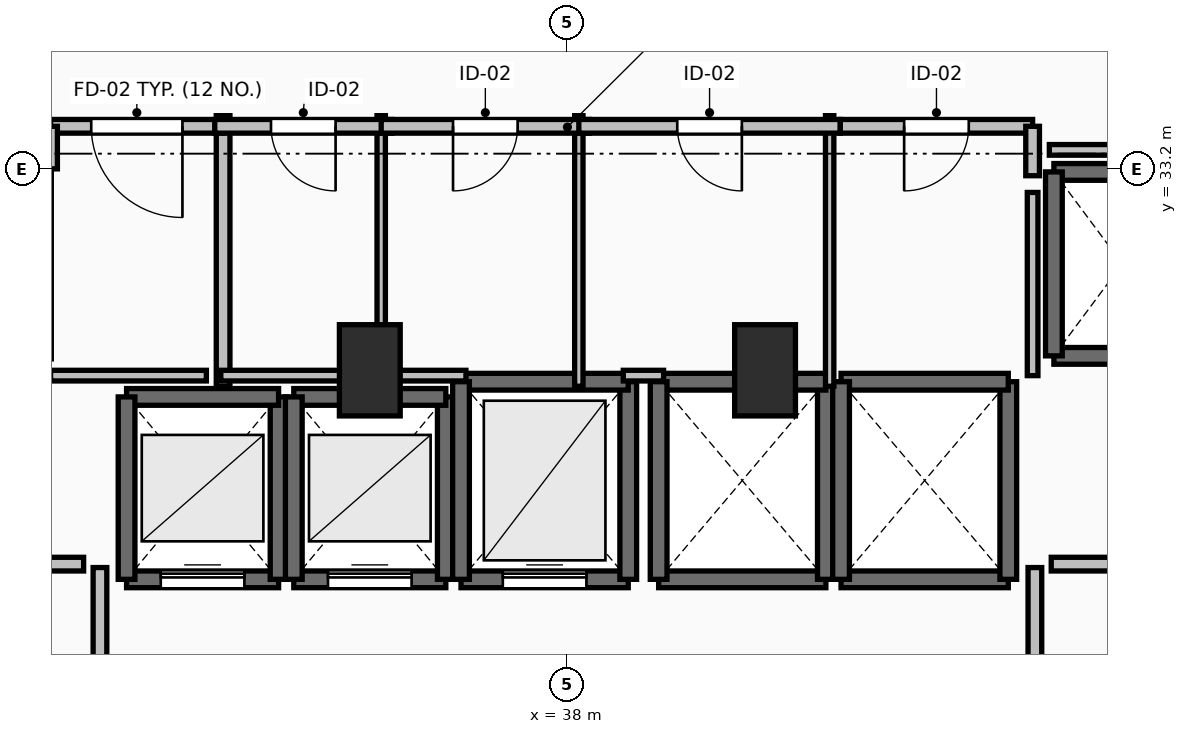
"""IFC4 building model, lengths in metres.
Left out: names, types, materials, properties, quantities, classifications, styles, units other than length and angle.
Written with IfcOpenShell. Run it as: python <this file> out.ifc"""

import sys

from ifc_helpers import new_model, si_unit, direction, frame, frame_2d, origin, origin_2d, place, context, subcontext, project, spatial, rectangle, extrude, element, fill, save


model = new_model("IFC4")
c1 = context("Model", 3, precision=1e-05, world=origin(), true_north=direction((0.0, 1.0)))
c2 = subcontext(c1, "Body", "Model", "MODEL_VIEW")
j1 = project(units=[si_unit("LENGTHUNIT", "METRE"), si_unit("PLANEANGLEUNIT", "RADIAN")], contexts=[c1])
p1 = place(None, origin())
s1 = spatial("IfcSite", under=j1, at=p1, CompositionType="ELEMENT")
p2 = place(p1, origin())
s2 = spatial("IfcBuilding", under=s1, at=p2, CompositionType="ELEMENT")
p3 = place(p2, frame((0.0, 0.0, 14.4)))
s3 = spatial("IfcBuildingStorey", under=s2, at=p3, CompositionType="ELEMENT", Elevation=14.4)
for number, where, z_axis, x_axis in (
    (1, (35.4, 30.55, 0.0), (0.0, 0.0, 1.0), (1.0, 0.0, 0.0)),
    (2, (40.6, 30.55, 0.0), (0.0, 0.0, 1.0), (1.0, 0.0, 0.0)),
):
    element("IfcColumn", number, at=place(p3, frame(where, z_axis=z_axis, x_axis=x_axis)), inside=s3, PredefinedType="PILASTER", context=c2, shape_type="SweptSolid", body=[
        extrude(rectangle(XDim=0.8, YDim=1.2, at=origin_2d()), origin(), (0.0, 0.0, 1.0), 4.8),
    ])
p4 = place(p3, frame((32.2, 27.8, 0.0), z_axis=(0.0, 0.0, 1.0), x_axis=(1.0, 0.0, 0.0)))
e3 = element("IfcWall", 3, at=p4, inside=s3, PredefinedType="SOLIDWALL", context=c2, shape_type="SweptSolid", body=[
    extrude(rectangle(XDim=2.0, YDim=0.22, at=frame_2d((1.0, 0.0))), origin(), (0.0, 0.0, 1.0), 4.48),
])
p5 = place(p4, frame((0.45, 0.0, 0.0)))
e4 = element("IfcOpeningElement", 4, at=p5, cuts=e3, PredefinedType="OPENING", context=c2, shape_type="SweptSolid", body=[
    extrude(rectangle(XDim=1.1, YDim=2.2, at=frame_2d((0.55, 1.1))), frame((0.0, 0.125, 0.0), z_axis=(0.0, -1.0, 0.0), x_axis=(1.0, 0.0, 0.0)), (0.0, 0.0, 1.0), 0.25),
])
p6 = place(p3, frame((34.2, 27.8, 0.0), z_axis=(0.0, 0.0, 1.0), x_axis=(0.0, 1.0, 0.0)))
e5 = element("IfcWall", 5, at=p6, inside=s3, PredefinedType="SOLIDWALL", context=c2, shape_type="SweptSolid", body=[
    extrude(rectangle(XDim=2.4, YDim=0.22, at=frame_2d((1.2, 0.0))), origin(), (0.0, 0.0, 1.0), 4.48),
])
p7 = place(p3, frame((34.2, 30.2, 0.0), z_axis=(0.0, 0.0, 1.0), x_axis=(-1.0, 0.0, 0.0)))
e6 = element("IfcWall", 6, at=p7, inside=s3, PredefinedType="SOLIDWALL", context=c2, shape_type="SweptSolid", body=[
    extrude(rectangle(XDim=2.0, YDim=0.22, at=frame_2d((1.0, 0.0))), origin(), (0.0, 0.0, 1.0), 4.48),
])
p8 = place(p3, frame((32.2, 30.2, 0.0), z_axis=(0.0, 0.0, 1.0), x_axis=(0.0, -1.0, 0.0)))
e7 = element("IfcWall", 7, at=p8, inside=s3, PredefinedType="SOLIDWALL", context=c2, shape_type="SweptSolid", body=[
    extrude(rectangle(XDim=2.4, YDim=0.22, at=frame_2d((1.2, 0.0))), origin(), (0.0, 0.0, 1.0), 4.48),
])
p9 = place(p3, frame((34.4, 27.8, 0.0), z_axis=(0.0, 0.0, 1.0), x_axis=(1.0, 0.0, 0.0)))
e8 = element("IfcWall", 8, at=p9, inside=s3, PredefinedType="SOLIDWALL", context=c2, shape_type="SweptSolid", body=[
    extrude(rectangle(XDim=2.0, YDim=0.22, at=frame_2d((1.0, 0.0))), origin(), (0.0, 0.0, 1.0), 4.48),
])
p10 = place(p9, frame((0.45, 0.0, 0.0)))
e9 = element("IfcOpeningElement", 9, at=p10, cuts=e8, PredefinedType="OPENING", context=c2, shape_type="SweptSolid", body=[
    extrude(rectangle(XDim=1.1, YDim=2.2, at=frame_2d((0.55, 1.1))), frame((0.0, 0.125, 0.0), z_axis=(0.0, -1.0, 0.0), x_axis=(1.0, 0.0, 0.0)), (0.0, 0.0, 1.0), 0.25),
])
p11 = place(p3, frame((36.4, 27.8, 0.0), z_axis=(0.0, 0.0, 1.0), x_axis=(0.0, 1.0, 0.0)))
e10 = element("IfcWall", 10, at=p11, inside=s3, PredefinedType="SOLIDWALL", context=c2, shape_type="SweptSolid", body=[
    extrude(rectangle(XDim=2.4, YDim=0.22, at=frame_2d((1.2, 0.0))), origin(), (0.0, 0.0, 1.0), 4.48),
])
p12 = place(p3, frame((36.4, 30.2, 0.0), z_axis=(0.0, 0.0, 1.0), x_axis=(-1.0, 0.0, 0.0)))
e11 = element("IfcWall", 11, at=p12, inside=s3, PredefinedType="SOLIDWALL", context=c2, shape_type="SweptSolid", body=[
    extrude(rectangle(XDim=2.0, YDim=0.22, at=frame_2d((1.0, 0.0))), origin(), (0.0, 0.0, 1.0), 4.48),
])
p13 = place(p3, frame((34.4, 30.2, 0.0), z_axis=(0.0, 0.0, 1.0), x_axis=(0.0, -1.0, 0.0)))
e12 = element("IfcWall", 12, at=p13, inside=s3, PredefinedType="SOLIDWALL", context=c2, shape_type="SweptSolid", body=[
    extrude(rectangle(XDim=2.4, YDim=0.22, at=frame_2d((1.2, 0.0))), origin(), (0.0, 0.0, 1.0), 4.48),
])
p14 = place(p3, frame((36.6, 27.8, 0.0), z_axis=(0.0, 0.0, 1.0), x_axis=(1.0, 0.0, 0.0)))
e13 = element("IfcWall", 13, at=p14, inside=s3, PredefinedType="SOLIDWALL", context=c2, shape_type="SweptSolid", body=[
    extrude(rectangle(XDim=2.2, YDim=0.22, at=frame_2d((1.1, 0.0))), origin(), (0.0, 0.0, 1.0), 4.48),
])
p15 = place(p14, frame((0.55, 0.0, 0.0)))
e14 = element("IfcOpeningElement", 14, at=p15, cuts=e13, PredefinedType="OPENING", context=c2, shape_type="SweptSolid", body=[
    extrude(rectangle(XDim=1.1, YDim=2.2, at=frame_2d((0.55, 1.1))), frame((0.0, 0.125, 0.0), z_axis=(0.0, -1.0, 0.0), x_axis=(1.0, 0.0, 0.0)), (0.0, 0.0, 1.0), 0.25),
])
p16 = place(p3, frame((38.8, 27.8, 0.0), z_axis=(0.0, 0.0, 1.0), x_axis=(0.0, 1.0, 0.0)))
e15 = element("IfcWall", 15, at=p16, inside=s3, PredefinedType="SOLIDWALL", context=c2, shape_type="SweptSolid", body=[
    extrude(rectangle(XDim=2.6, YDim=0.22, at=frame_2d((1.3, 0.0))), origin(), (0.0, 0.0, 1.0), 4.48),
])
p17 = place(p3, frame((38.8, 30.4, 0.0), z_axis=(0.0, 0.0, 1.0), x_axis=(-1.0, 0.0, 0.0)))
e16 = element("IfcWall", 16, at=p17, inside=s3, PredefinedType="SOLIDWALL", context=c2, shape_type="SweptSolid", body=[
    extrude(rectangle(XDim=2.2, YDim=0.22, at=frame_2d((1.1, 0.0))), origin(), (0.0, 0.0, 1.0), 4.48),
])
p18 = place(p3, frame((36.6, 30.4, 0.0), z_axis=(0.0, 0.0, 1.0), x_axis=(0.0, -1.0, 0.0)))
e17 = element("IfcWall", 17, at=p18, inside=s3, PredefinedType="SOLIDWALL", context=c2, shape_type="SweptSolid", body=[
    extrude(rectangle(XDim=2.6, YDim=0.22, at=frame_2d((1.3, 0.0))), origin(), (0.0, 0.0, 1.0), 4.48),
])
p19 = place(p3, frame((39.2, 27.8, 0.0), z_axis=(0.0, 0.0, 1.0), x_axis=(1.0, 0.0, 0.0)))
e18 = element("IfcWall", 18, at=p19, inside=s3, PredefinedType="SOLIDWALL", context=c2, shape_type="SweptSolid", body=[
    extrude(rectangle(XDim=2.2, YDim=0.22, at=frame_2d((1.1, 0.0))), origin(), (0.0, 0.0, 1.0), 4.48),
])
p20 = place(p3, frame((41.4, 27.8, 0.0), z_axis=(0.0, 0.0, 1.0), x_axis=(0.0, 1.0, 0.0)))
e19 = element("IfcWall", 19, at=p20, inside=s3, PredefinedType="SOLIDWALL", context=c2, shape_type="SweptSolid", body=[
    extrude(rectangle(XDim=2.6, YDim=0.22, at=frame_2d((1.3, 0.0))), origin(), (0.0, 0.0, 1.0), 4.48),
])
p21 = place(p3, frame((41.4, 30.4, 0.0), z_axis=(0.0, 0.0, 1.0), x_axis=(-1.0, 0.0, 0.0)))
e20 = element("IfcWall", 20, at=p21, inside=s3, PredefinedType="SOLIDWALL", context=c2, shape_type="SweptSolid", body=[
    extrude(rectangle(XDim=2.2, YDim=0.22, at=frame_2d((1.1, 0.0))), origin(), (0.0, 0.0, 1.0), 4.48),
])
p22 = place(p3, frame((39.2, 30.4, 0.0), z_axis=(0.0, 0.0, 1.0), x_axis=(0.0, -1.0, 0.0)))
e21 = element("IfcWall", 21, at=p22, inside=s3, PredefinedType="SOLIDWALL", context=c2, shape_type="SweptSolid", body=[
    extrude(rectangle(XDim=2.6, YDim=0.22, at=frame_2d((1.3, 0.0))), origin(), (0.0, 0.0, 1.0), 4.48),
])
p23 = place(p3, frame((41.6, 27.8, 0.0), z_axis=(0.0, 0.0, 1.0), x_axis=(1.0, 0.0, 0.0)))
e22 = element("IfcWall", 22, at=p23, inside=s3, PredefinedType="SOLIDWALL", context=c2, shape_type="SweptSolid", body=[
    extrude(rectangle(XDim=2.2, YDim=0.22, at=frame_2d((1.1, 0.0))), origin(), (0.0, 0.0, 1.0), 4.48),
])
p24 = place(p3, frame((43.8, 27.8, 0.0), z_axis=(0.0, 0.0, 1.0), x_axis=(0.0, 1.0, 0.0)))
e23 = element("IfcWall", 23, at=p24, inside=s3, PredefinedType="SOLIDWALL", context=c2, shape_type="SweptSolid", body=[
    extrude(rectangle(XDim=2.6, YDim=0.22, at=frame_2d((1.3, 0.0))), origin(), (0.0, 0.0, 1.0), 4.48),
])
p25 = place(p3, frame((43.8, 30.4, 0.0), z_axis=(0.0, 0.0, 1.0), x_axis=(-1.0, 0.0, 0.0)))
e24 = element("IfcWall", 24, at=p25, inside=s3, PredefinedType="SOLIDWALL", context=c2, shape_type="SweptSolid", body=[
    extrude(rectangle(XDim=2.2, YDim=0.22, at=frame_2d((1.1, 0.0))), origin(), (0.0, 0.0, 1.0), 4.48),
])
p26 = place(p3, frame((41.6, 30.4, 0.0), z_axis=(0.0, 0.0, 1.0), x_axis=(0.0, -1.0, 0.0)))
e25 = element("IfcWall", 25, at=p26, inside=s3, PredefinedType="SOLIDWALL", context=c2, shape_type="SweptSolid", body=[
    extrude(rectangle(XDim=2.6, YDim=0.22, at=frame_2d((1.3, 0.0))), origin(), (0.0, 0.0, 1.0), 4.48),
])
for number, where, z_axis, x_axis in (
    (26, (44.4, 30.74, 0.0), (0.0, 0.0, 1.0), (1.0, 0.0, 0.0)),
    (27, (46.2, 33.16, 0.0), (0.0, 0.0, 1.0), (-1.0, 0.0, 0.0)),
):
    element("IfcWall", number, at=place(p3, frame(where, z_axis=z_axis, x_axis=x_axis)), inside=s3, PredefinedType="SOLIDWALL", context=c2, shape_type="SweptSolid", body=[
        extrude(rectangle(XDim=1.8, YDim=0.22, at=frame_2d((0.9, 0.0))), origin(), (0.0, 0.0, 1.0), 4.48),
    ])
p27 = place(p3, frame((44.4, 33.16, 0.0), z_axis=(0.0, 0.0, 1.0), x_axis=(0.0, -1.0, 0.0)))
e28 = element("IfcWall", 28, at=p27, inside=s3, PredefinedType="SOLIDWALL", context=c2, shape_type="SweptSolid", body=[
    extrude(rectangle(XDim=2.42, YDim=0.22, at=frame_2d((1.21, 0.0))), origin(), (0.0, 0.0, 1.0), 4.48),
])
p28 = place(p3, frame((31.85, 24.045, 0.0), z_axis=(0.0, 0.0, 1.0), x_axis=(0.0, 1.0, 0.0)))
e29 = element("IfcWall", 29, at=p28, inside=s3, PredefinedType="PARTITIONING", context=c2, shape_type="SweptSolid", body=[
    extrude(rectangle(XDim=3.91, YDim=0.18, at=frame_2d((1.955, 0.0))), origin(), (0.0, 0.0, 1.0), 4.48),
])
p29 = place(p28, frame((1.355, 0.0, 0.0)))
e30 = element("IfcOpeningElement", 30, at=p29, cuts=e29, PredefinedType="OPENING", context=c2, shape_type="SweptSolid", body=[
    extrude(rectangle(XDim=1.2, YDim=2.15, at=frame_2d((0.6, 1.075))), frame((0.0, 0.105, 0.0), z_axis=(0.0, -1.0, 0.0), x_axis=(1.0, 0.0, 0.0)), (0.0, 0.0, 1.0), 0.21),
])
p30 = place(p3, frame((44.15, 27.955, 0.0), z_axis=(0.0, 0.0, 1.0), x_axis=(0.0, -1.0, 0.0)))
e31 = element("IfcWall", 31, at=p30, inside=s3, PredefinedType="PARTITIONING", context=c2, shape_type="SweptSolid", body=[
    extrude(rectangle(XDim=3.91, YDim=0.18, at=frame_2d((1.955, 0.0))), origin(), (0.0, 0.0, 1.0), 4.48),
])
p31 = place(p30, frame((1.355, 0.0, 0.0)))
e32 = element("IfcOpeningElement", 32, at=p31, cuts=e31, PredefinedType="OPENING", context=c2, shape_type="SweptSolid", body=[
    extrude(rectangle(XDim=1.2, YDim=2.15, at=frame_2d((0.6, 1.075))), frame((0.0, 0.105, 0.0), z_axis=(0.0, -1.0, 0.0), x_axis=(1.0, 0.0, 0.0)), (0.0, 0.0, 1.0), 0.21),
])
p32 = place(p3, frame((33.47, 30.34, 0.0), z_axis=(0.0, 0.0, 1.0), x_axis=(0.0, 1.0, 0.0)))
e33 = element("IfcWall", 33, at=p32, inside=s3, PredefinedType="PARTITIONING", context=c2, shape_type="SweptSolid", body=[
    extrude(rectangle(XDim=3.56, YDim=0.18, at=frame_2d((1.78, 0.0))), origin(), (0.0, 0.0, 1.0), 4.48),
])
p33 = place(p3, frame((33.47, 33.76, 0.0), z_axis=(0.0, 0.0, 1.0), x_axis=(-1.0, 0.0, 0.0)))
e34 = element("IfcWall", 34, at=p33, inside=s3, PredefinedType="PARTITIONING", context=c2, shape_type="SweptSolid", body=[
    extrude(rectangle(XDim=2.27, YDim=0.18, at=frame_2d((1.135, 0.0))), origin(), (0.0, 0.0, 1.0), 4.48),
])
p34 = place(p33, frame((0.535, 0.0, 0.0)))
e35 = element("IfcOpeningElement", 35, at=p34, cuts=e34, PredefinedType="OPENING", context=c2, shape_type="SweptSolid", body=[
    extrude(rectangle(XDim=1.2, YDim=2.15, at=frame_2d((0.6, 1.075))), frame((0.0, 0.105, 0.0), z_axis=(0.0, -1.0, 0.0), x_axis=(1.0, 0.0, 0.0)), (0.0, 0.0, 1.0), 0.21),
])
p35 = place(p3, frame((31.2, 33.76, 0.0), z_axis=(0.0, 0.0, 1.0), x_axis=(0.0, -1.0, 0.0)))
e36 = element("IfcWall", 36, at=p35, inside=s3, PredefinedType="PARTITIONING", context=c2, shape_type="SweptSolid", body=[
    extrude(rectangle(XDim=0.56, YDim=0.18, at=frame_2d((0.28, 0.0))), origin(), (0.0, 0.0, 1.0), 4.48),
])
p36 = place(p3, frame((35.55, 30.34, 0.0), z_axis=(0.0, 0.0, 1.0), x_axis=(0.0, 1.0, 0.0)))
e37 = element("IfcWall", 37, at=p36, inside=s3, PredefinedType="PARTITIONING", context=c2, shape_type="SweptSolid", body=[
    extrude(rectangle(XDim=3.56, YDim=0.11, at=frame_2d((1.78, 0.0))), origin(), (0.0, 0.0, 1.0), 3.672),
])
p37 = place(p3, frame((35.69, 33.76, 0.0), z_axis=(0.0, 0.0, 1.0), x_axis=(-1.0, 0.0, 0.0)))
e38 = element("IfcWall", 38, at=p37, inside=s3, PredefinedType="PARTITIONING", context=c2, shape_type="SweptSolid", body=[
    extrude(rectangle(XDim=2.33, YDim=0.18, at=frame_2d((1.165, 0.0))), origin(), (0.0, 0.0, 1.0), 4.48),
])
p38 = place(p37, frame((0.74, 0.0, 0.0)))
e39 = element("IfcOpeningElement", 39, at=p38, cuts=e38, PredefinedType="OPENING", context=c2, shape_type="SweptSolid", body=[
    extrude(rectangle(XDim=0.85, YDim=2.1, at=frame_2d((0.425, 1.05))), frame((0.0, 0.105, 0.0), z_axis=(0.0, -1.0, 0.0), x_axis=(1.0, 0.0, 0.0)), (0.0, 0.0, 1.0), 0.21),
])
p39 = place(p3, frame((38.15, 30.34, 0.0), z_axis=(0.0, 0.0, 1.0), x_axis=(0.0, 1.0, 0.0)))
e40 = element("IfcWall", 40, at=p39, inside=s3, PredefinedType="PARTITIONING", context=c2, shape_type="SweptSolid", body=[
    extrude(rectangle(XDim=3.56, YDim=0.11, at=frame_2d((1.78, 0.0))), origin(), (0.0, 0.0, 1.0), 3.672),
])
p40 = place(p3, frame((38.29, 33.76, 0.0), z_axis=(0.0, 0.0, 1.0), x_axis=(-1.0, 0.0, 0.0)))
e41 = element("IfcWall", 41, at=p40, inside=s3, PredefinedType="PARTITIONING", context=c2, shape_type="SweptSolid", body=[
    extrude(rectangle(XDim=2.74, YDim=0.18, at=frame_2d((1.37, 0.0))), origin(), (0.0, 0.0, 1.0), 4.48),
])
p41 = place(p40, frame((0.945, 0.0, 0.0)))
e42 = element("IfcOpeningElement", 42, at=p41, cuts=e41, PredefinedType="OPENING", context=c2, shape_type="SweptSolid", body=[
    extrude(rectangle(XDim=0.85, YDim=2.1, at=frame_2d((0.425, 1.05))), frame((0.0, 0.105, 0.0), z_axis=(0.0, -1.0, 0.0), x_axis=(1.0, 0.0, 0.0)), (0.0, 0.0, 1.0), 0.21),
])
p42 = place(p3, frame((41.45, 30.34, 0.0), z_axis=(0.0, 0.0, 1.0), x_axis=(0.0, 1.0, 0.0)))
e43 = element("IfcWall", 43, at=p42, inside=s3, PredefinedType="PARTITIONING", context=c2, shape_type="SweptSolid", body=[
    extrude(rectangle(XDim=3.56, YDim=0.11, at=frame_2d((1.78, 0.0))), origin(), (0.0, 0.0, 1.0), 4.48),
])
p43 = place(p3, frame((41.59, 33.76, 0.0), z_axis=(0.0, 0.0, 1.0), x_axis=(-1.0, 0.0, 0.0)))
e44 = element("IfcWall", 44, at=p43, inside=s3, PredefinedType="PARTITIONING", context=c2, shape_type="SweptSolid", body=[
    extrude(rectangle(XDim=3.44, YDim=0.18, at=frame_2d((1.72, 0.0))), origin(), (0.0, 0.0, 1.0), 4.48),
])
p44 = place(p43, frame((1.295, 0.0, 0.0)))
e45 = element("IfcOpeningElement", 45, at=p44, cuts=e44, PredefinedType="OPENING", context=c2, shape_type="SweptSolid", body=[
    extrude(rectangle(XDim=0.85, YDim=2.1, at=frame_2d((0.425, 1.05))), frame((0.0, 0.105, 0.0), z_axis=(0.0, -1.0, 0.0), x_axis=(1.0, 0.0, 0.0)), (0.0, 0.0, 1.0), 0.21),
])
p45 = place(p3, frame((44.12, 33.76, 0.0), z_axis=(0.0, 0.0, 1.0), x_axis=(-1.0, 0.0, 0.0)))
e46 = element("IfcWall", 46, at=p45, inside=s3, PredefinedType="PARTITIONING", context=c2, shape_type="SweptSolid", body=[
    extrude(rectangle(XDim=2.53, YDim=0.18, at=frame_2d((1.265, 0.0))), origin(), (0.0, 0.0, 1.0), 4.48),
])
p46 = place(p45, frame((0.84, 0.0, 0.0)))
e47 = element("IfcOpeningElement", 47, at=p46, cuts=e46, PredefinedType="OPENING", context=c2, shape_type="SweptSolid", body=[
    extrude(rectangle(XDim=0.85, YDim=2.1, at=frame_2d((0.425, 1.05))), frame((0.0, 0.105, 0.0), z_axis=(0.0, -1.0, 0.0), x_axis=(1.0, 0.0, 0.0)), (0.0, 0.0, 1.0), 0.21),
])
p47 = place(p3, frame((44.12, 33.11, 0.0), z_axis=(0.0, 0.0, 1.0), x_axis=(0.0, 1.0, 0.0)))
e48 = element("IfcWall", 48, at=p47, inside=s3, PredefinedType="PARTITIONING", context=c2, shape_type="SweptSolid", body=[
    extrude(rectangle(XDim=0.65, YDim=0.18, at=frame_2d((0.325, 0.0))), origin(), (0.0, 0.0, 1.0), 4.48),
])
for number, where, z_axis, x_axis in (
    (49, (31.635, 28.0, 0.0), (0.0, 0.0, 1.0), (-1.0, 0.0, 0.0)),
    (50, (45.28, 28.0, 0.0), (0.0, 0.0, 1.0), (-1.0, 0.0, 0.0)),
):
    element("IfcWall", number, at=place(p3, frame(where, z_axis=z_axis, x_axis=x_axis)), inside=s3, PredefinedType="PARTITIONING", context=c2, shape_type="SweptSolid", body=[
        extrude(rectangle(XDim=0.915, YDim=0.18, at=frame_2d((0.458, 0.0))), origin(), (0.0, 0.0, 1.0), 4.48),
    ])
p48 = place(p3, frame((31.2, 30.48, 0.0), z_axis=(0.0, 0.0, 1.0), x_axis=(1.0, 0.0, 0.0)))
e51 = element("IfcWall", 51, at=p48, inside=s3, PredefinedType="PARTITIONING", context=c2, shape_type="SweptSolid", body=[
    extrude(rectangle(XDim=2.05, YDim=0.14, at=frame_2d((1.025, 0.0))), origin(), (0.0, 0.0, 1.0), 4.48),
])
p49 = place(p3, frame((33.44, 30.48, 0.0), z_axis=(0.0, 0.0, 1.0), x_axis=(1.0, 0.0, 0.0)))
e52 = element("IfcWall", 52, at=p49, inside=s3, PredefinedType="PARTITIONING", context=c2, shape_type="SweptSolid", body=[
    extrude(rectangle(XDim=2.14, YDim=0.14, at=frame_2d((1.07, 0.0))), origin(), (0.0, 0.0, 1.0), 3.672),
])
p50 = place(p3, frame((35.6, 30.48, 0.0), z_axis=(0.0, 0.0, 1.0), x_axis=(1.0, 0.0, 0.0)))
e53 = element("IfcWall", 53, at=p50, inside=s3, PredefinedType="PARTITIONING", context=c2, shape_type="SweptSolid", body=[
    extrude(rectangle(XDim=1.065, YDim=0.14, at=frame_2d((0.532, 0.0))), origin(), (0.0, 0.0, 1.0), 3.672),
])
p51 = place(p3, frame((38.735, 30.48, 0.0), z_axis=(0.0, 0.0, 1.0), x_axis=(1.0, 0.0, 0.0)))
e54 = element("IfcWall", 54, at=p51, inside=s3, PredefinedType="PARTITIONING", context=c2, shape_type="SweptSolid", body=[
    extrude(rectangle(XDim=0.53, YDim=0.14, at=frame_2d((0.265, 0.0))), origin(), (0.0, 0.0, 1.0), 3.672),
])
p52 = place(p3, frame((44.12, 30.48, 0.0), z_axis=(0.0, 0.0, 1.0), x_axis=(0.0, 1.0, 0.0)))
e55 = element("IfcWall", 55, at=p52, inside=s3, PredefinedType="PARTITIONING", context=c2, shape_type="SweptSolid", body=[
    extrude(rectangle(XDim=2.41, YDim=0.14, at=frame_2d((1.205, 0.0))), origin(), (0.0, 0.0, 1.0), 4.48),
])
p53 = place(p3, frame((44.34, 33.45, 0.0), z_axis=(0.0, 0.0, 1.0), x_axis=(1.0, 0.0, 0.0)))
e56 = element("IfcWall", 56, at=p53, inside=s3, PredefinedType="PARTITIONING", context=c2, shape_type="SweptSolid", body=[
    extrude(rectangle(XDim=4.21, YDim=0.14, at=frame_2d((2.105, 0.0))), origin(), (0.0, 0.0, 1.0), 3.672),
])
p54 = place(p5, origin())
e57 = element("IfcDoor", 57, at=p54, inside=s3, OperationType="SLIDING_TO_LEFT", PredefinedType="DOOR", context=c2, shape_type="SweptSolid", body=[
    extrude(rectangle(XDim=1.1, YDim=2.2, at=frame_2d((0.55, 1.1))), frame((0.0, 0.025, 0.0), z_axis=(0.0, -1.0, 0.0), x_axis=(1.0, 0.0, 0.0)), (0.0, 0.0, 1.0), 0.05),
])
fill(e4, e57)
p55 = place(p10, origin())
e58 = element("IfcDoor", 58, at=p55, inside=s3, OperationType="SLIDING_TO_LEFT", PredefinedType="DOOR", context=c2, shape_type="SweptSolid", body=[
    extrude(rectangle(XDim=1.1, YDim=2.2, at=frame_2d((0.55, 1.1))), frame((0.0, 0.025, 0.0), z_axis=(0.0, -1.0, 0.0), x_axis=(1.0, 0.0, 0.0)), (0.0, 0.0, 1.0), 0.05),
])
fill(e9, e58)
p56 = place(p15, origin())
e59 = element("IfcDoor", 59, at=p56, inside=s3, OperationType="SLIDING_TO_LEFT", PredefinedType="DOOR", context=c2, shape_type="SweptSolid", body=[
    extrude(rectangle(XDim=1.1, YDim=2.2, at=frame_2d((0.55, 1.1))), frame((0.0, 0.025, 0.0), z_axis=(0.0, -1.0, 0.0), x_axis=(1.0, 0.0, 0.0)), (0.0, 0.0, 1.0), 0.05),
])
fill(e14, e59)
p57 = place(p34, origin())
e60 = element("IfcDoor", 60, at=p57, inside=s3, OperationType="SINGLE_SWING_LEFT", PredefinedType="DOOR", context=c2, shape_type="SweptSolid", body=[
    extrude(rectangle(XDim=1.2, YDim=2.15, at=frame_2d((0.6, 1.075))), frame((0.0, 0.025, 0.0), z_axis=(0.0, -1.0, 0.0), x_axis=(1.0, 0.0, 0.0)), (0.0, 0.0, 1.0), 0.05),
])
fill(e35, e60)
p58 = place(p38, origin())
e61 = element("IfcDoor", 61, at=p58, inside=s3, OperationType="SINGLE_SWING_LEFT", PredefinedType="DOOR", context=c2, shape_type="SweptSolid", body=[
    extrude(rectangle(XDim=0.85, YDim=2.1, at=frame_2d((0.425, 1.05))), frame((0.0, 0.025, 0.0), z_axis=(0.0, -1.0, 0.0), x_axis=(1.0, 0.0, 0.0)), (0.0, 0.0, 1.0), 0.05),
])
fill(e39, e61)
p59 = place(p41, origin())
e62 = element("IfcDoor", 62, at=p59, inside=s3, OperationType="SINGLE_SWING_RIGHT", PredefinedType="DOOR", context=c2, shape_type="SweptSolid", body=[
    extrude(rectangle(XDim=0.85, YDim=2.1, at=frame_2d((0.425, 1.05))), frame((0.0, 0.025, 0.0), z_axis=(0.0, -1.0, 0.0), x_axis=(1.0, 0.0, 0.0)), (0.0, 0.0, 1.0), 0.05),
])
fill(e42, e62)
p60 = place(p44, origin())
e63 = element("IfcDoor", 63, at=p60, inside=s3, OperationType="SINGLE_SWING_LEFT", PredefinedType="DOOR", context=c2, shape_type="SweptSolid", body=[
    extrude(rectangle(XDim=0.85, YDim=2.1, at=frame_2d((0.425, 1.05))), frame((0.0, 0.025, 0.0), z_axis=(0.0, -1.0, 0.0), x_axis=(1.0, 0.0, 0.0)), (0.0, 0.0, 1.0), 0.05),
])
fill(e45, e63)
p61 = place(p46, origin())
e64 = element("IfcDoor", 64, at=p61, inside=s3, OperationType="SINGLE_SWING_RIGHT", PredefinedType="DOOR", context=c2, shape_type="SweptSolid", body=[
    extrude(rectangle(XDim=0.85, YDim=2.1, at=frame_2d((0.425, 1.05))), frame((0.0, 0.025, 0.0), z_axis=(0.0, -1.0, 0.0), x_axis=(1.0, 0.0, 0.0)), (0.0, 0.0, 1.0), 0.05),
])
fill(e47, e64)
save(model, sys.argv[1])
